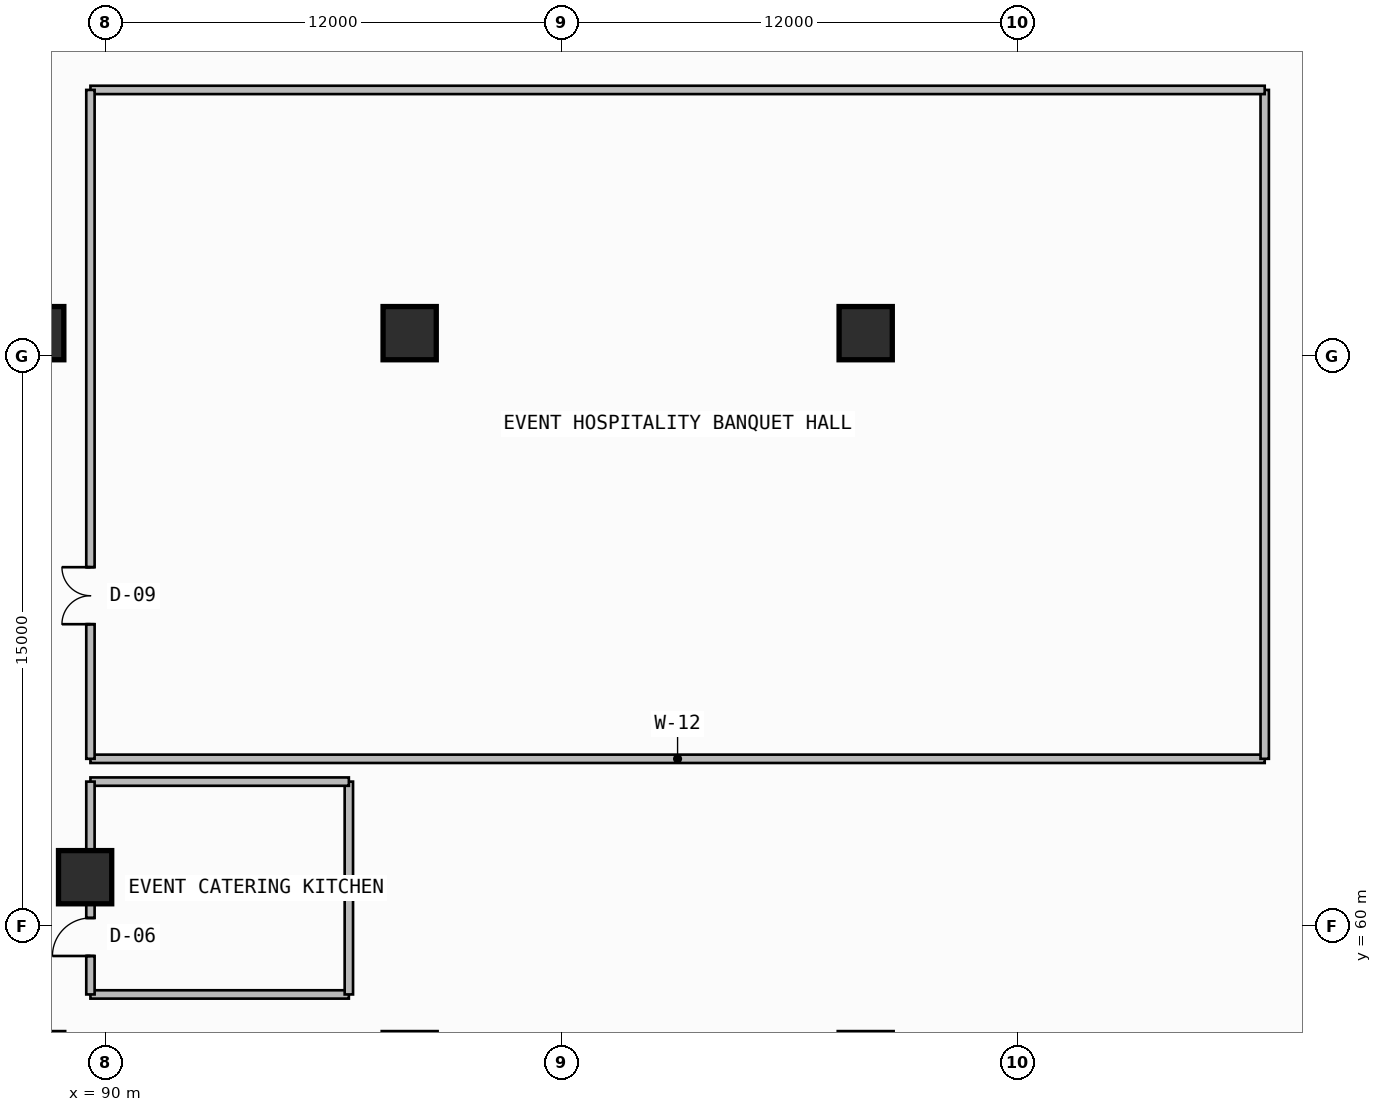
"""IFC4 building model, lengths in metres.
Left out: names, types, materials, properties, quantities, classifications, styles, units other than length and angle.
Written with IfcOpenShell. Run it as: python <this file> out.ifc"""

import sys

from ifc_helpers import new_model, si_unit, direction, frame, frame_2d, origin, origin_2d, place, context, subcontext, project, spatial, rectangle, extrude, element, fill, save


model = new_model("IFC4")
c1 = context("Model", 3, precision=1e-05, world=origin(), true_north=direction((0.0, 1.0)))
c2 = subcontext(c1, "Body", "Model", "MODEL_VIEW")
j1 = project(units=[si_unit("LENGTHUNIT", "METRE"), si_unit("PLANEANGLEUNIT", "RADIAN")], contexts=[c1])
p1 = place(None, origin())
s1 = spatial("IfcSite", under=j1, at=p1, CompositionType="ELEMENT")
p2 = place(p1, origin())
s2 = spatial("IfcBuilding", under=s1, at=p2, CompositionType="ELEMENT")
p3 = place(p2, frame((0.0, 0.0, 4.5)))
s3 = spatial("IfcBuildingStorey", under=s2, at=p3, CompositionType="ELEMENT", Elevation=4.5)
for number, where, z_axis, x_axis in (
    (1, (88.2, 75.6, 0.0), (0.0, 0.0, 1.0), (1.0, 0.0, 0.0)),
    (2, (98.0, 75.6, 0.0), (0.0, 0.0, 1.0), (1.0, 0.0, 0.0)),
    (3, (110.0, 75.6, 0.0), (0.0, 0.0, 1.0), (1.0, 0.0, 0.0)),
    (4, (89.46, 61.285, 0.0), (0.0, 0.0, 1.0), (1.0, 0.0, 0.0)),
):
    element("IfcColumn", number, at=place(p3, frame(where, z_axis=z_axis, x_axis=x_axis)), inside=s3, PredefinedType="COLUMN", context=c2, shape_type="SweptSolid", body=[
        extrude(rectangle(XDim=1.4, YDim=1.4, at=origin_2d()), origin(), (0.0, 0.0, 1.0), 4.5),
    ])
p4 = place(p3, frame((89.6, 58.2, 0.0), z_axis=(0.0, 0.0, 1.0), x_axis=(1.0, 0.0, 0.0)))
e5 = element("IfcWall", 5, at=p4, inside=s3, PredefinedType="SOLIDWALL", context=c2, shape_type="SweptSolid", body=[
    extrude(rectangle(XDim=6.8, YDim=0.22, at=frame_2d((3.4, 0.0))), origin(), (0.0, 0.0, 1.0), 3.665),
])
p5 = place(p3, frame((96.4, 58.2, 0.0), z_axis=(0.0, 0.0, 1.0), x_axis=(0.0, 1.0, 0.0)))
e6 = element("IfcWall", 6, at=p5, inside=s3, PredefinedType="SOLIDWALL", context=c2, shape_type="SweptSolid", body=[
    extrude(rectangle(XDim=5.6, YDim=0.22, at=frame_2d((2.8, 0.0))), origin(), (0.0, 0.0, 1.0), 4.18),
])
p6 = place(p3, frame((96.4, 63.8, 0.0), z_axis=(0.0, 0.0, 1.0), x_axis=(-1.0, 0.0, 0.0)))
e7 = element("IfcWall", 7, at=p6, inside=s3, PredefinedType="SOLIDWALL", context=c2, shape_type="SweptSolid", body=[
    extrude(rectangle(XDim=6.8, YDim=0.22, at=frame_2d((3.4, 0.0))), origin(), (0.0, 0.0, 1.0), 3.665),
])
p7 = place(p3, frame((89.6, 63.8, 0.0), z_axis=(0.0, 0.0, 1.0), x_axis=(0.0, -1.0, 0.0)))
e8 = element("IfcWall", 8, at=p7, inside=s3, PredefinedType="SOLIDWALL", context=c2, shape_type="SweptSolid", body=[
    extrude(rectangle(XDim=5.6, YDim=0.22, at=frame_2d((2.8, 0.0))), origin(), (0.0, 0.0, 1.0), 4.18),
])
p8 = place(p7, frame((3.588, 0.0, 0.0)))
e9 = element("IfcOpeningElement", 9, at=p8, cuts=e8, PredefinedType="OPENING", context=c2, shape_type="SweptSolid", body=[
    extrude(rectangle(XDim=1.0, YDim=2.2, at=frame_2d((0.5, 1.1))), frame((0.0, 0.12, 0.0), z_axis=(0.0, -1.0, 0.0), x_axis=(1.0, 0.0, 0.0)), (0.0, 0.0, 1.0), 0.24),
])
p9 = place(p3, frame((89.6, 64.4, 0.0), z_axis=(0.0, 0.0, 1.0), x_axis=(1.0, 0.0, 0.0)))
e10 = element("IfcWall", 10, at=p9, inside=s3, PredefinedType="SOLIDWALL", context=c2, shape_type="SweptSolid", body=[
    extrude(rectangle(XDim=30.9, YDim=0.22, at=frame_2d((15.45, 0.0))), origin(), (0.0, 0.0, 1.0), 3.465),
])
p10 = place(p3, frame((120.5, 64.4, 0.0), z_axis=(0.0, 0.0, 1.0), x_axis=(0.0, 1.0, 0.0)))
e11 = element("IfcWall", 11, at=p10, inside=s3, PredefinedType="SOLIDWALL", context=c2, shape_type="SweptSolid", body=[
    extrude(rectangle(XDim=17.6, YDim=0.22, at=frame_2d((8.8, 0.0))), origin(), (0.0, 0.0, 1.0), 3.465),
])
p11 = place(p3, frame((120.5, 82.0, 0.0), z_axis=(0.0, 0.0, 1.0), x_axis=(-1.0, 0.0, 0.0)))
e12 = element("IfcWall", 12, at=p11, inside=s3, PredefinedType="SOLIDWALL", context=c2, shape_type="SweptSolid", body=[
    extrude(rectangle(XDim=30.9, YDim=0.22, at=frame_2d((15.45, 0.0))), origin(), (0.0, 0.0, 1.0), 3.465),
])
p12 = place(p3, frame((89.6, 82.0, 0.0), z_axis=(0.0, 0.0, 1.0), x_axis=(0.0, -1.0, 0.0)))
e13 = element("IfcWall", 13, at=p12, inside=s3, PredefinedType="SOLIDWALL", context=c2, shape_type="SweptSolid", body=[
    extrude(rectangle(XDim=17.6, YDim=0.22, at=frame_2d((8.8, 0.0))), origin(), (0.0, 0.0, 1.0), 3.465),
])
p13 = place(p12, frame((12.558, 0.0, 0.0)))
e14 = element("IfcOpeningElement", 14, at=p13, cuts=e13, PredefinedType="OPENING", context=c2, shape_type="SweptSolid", body=[
    extrude(rectangle(XDim=1.5, YDim=2.25, at=frame_2d((0.75, 1.125))), frame((0.0, 0.12, 0.0), z_axis=(0.0, -1.0, 0.0), x_axis=(1.0, 0.0, 0.0)), (0.0, 0.0, 1.0), 0.24),
])
p14 = place(p8, frame((1.0, 0.0, 0.0), z_axis=(0.0, 0.0, 1.0), x_axis=(-1.0, 0.0, 0.0)))
e15 = element("IfcDoor", 15, at=p14, inside=s3, OperationType="SINGLE_SWING_LEFT", PredefinedType="DOOR", context=c2, shape_type="SweptSolid", body=[
    extrude(rectangle(XDim=1.0, YDim=2.2, at=frame_2d((0.5, 1.1))), frame((0.0, 0.025, 0.0), z_axis=(0.0, -1.0, 0.0), x_axis=(1.0, 0.0, 0.0)), (0.0, 0.0, 1.0), 0.05),
])
fill(e9, e15)
p15 = place(p13, frame((1.5, 0.0, 0.0), z_axis=(0.0, 0.0, 1.0), x_axis=(-1.0, 0.0, 0.0)))
e16 = element("IfcDoor", 16, at=p15, inside=s3, OperationType="DOUBLE_DOOR_SINGLE_SWING", PredefinedType="DOOR", context=c2, shape_type="SweptSolid", body=[
    extrude(rectangle(XDim=1.5, YDim=2.25, at=frame_2d((0.75, 1.125))), frame((0.0, 0.025, 0.0), z_axis=(0.0, -1.0, 0.0), x_axis=(1.0, 0.0, 0.0)), (0.0, 0.0, 1.0), 0.05),
])
fill(e14, e16)
save(model, sys.argv[1])
